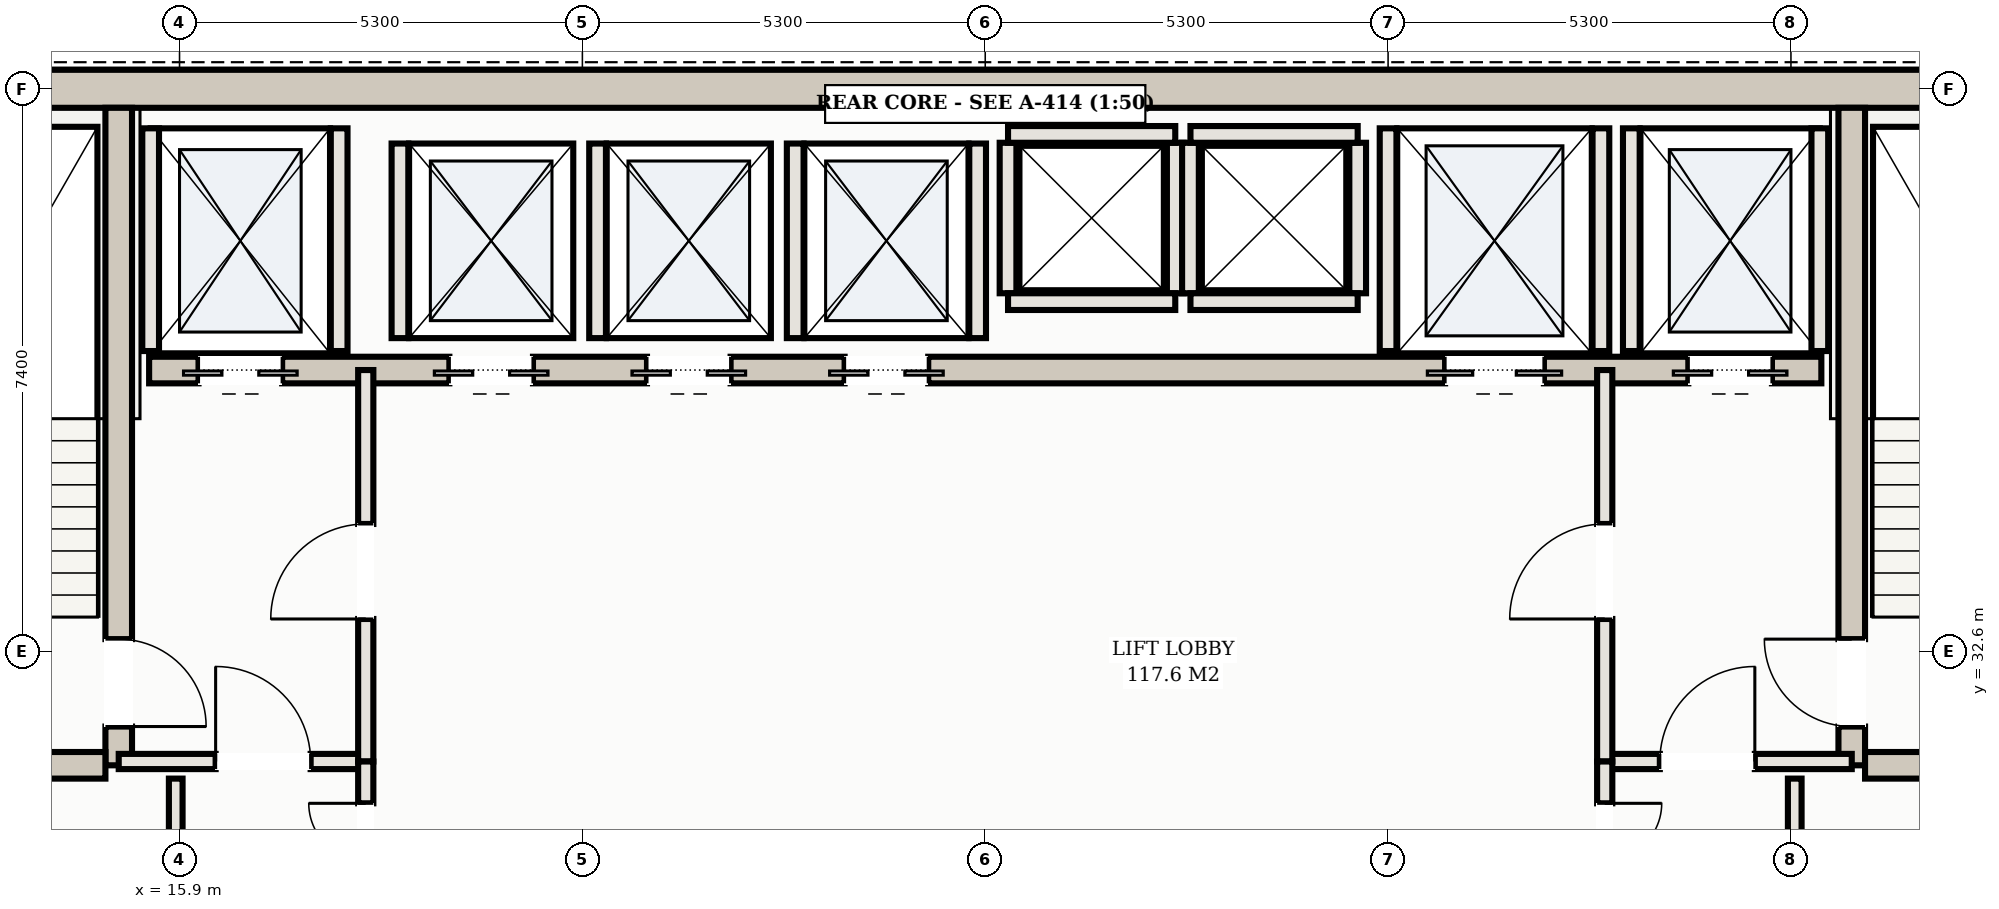
"""IFC4 building model, lengths in metres.
Left out: names, types, materials, properties, quantities, classifications, styles, units other than length and angle.
Written with IfcOpenShell. Run it as: python <this file> out.ifc"""

import sys

from ifc_helpers import new_model, si_unit, direction, frame, frame_2d, origin, place, context, subcontext, project, spatial, rectangle, extrude, element, fill, save


model = new_model("IFC4")
c1 = context("Model", 3, precision=1e-05, world=origin(), true_north=direction((0.0, 1.0)))
c2 = subcontext(c1, "Body", "Model", "MODEL_VIEW")
j1 = project(units=[si_unit("LENGTHUNIT", "METRE"), si_unit("PLANEANGLEUNIT", "RADIAN")], contexts=[c1])
p1 = place(None, origin())
s1 = spatial("IfcSite", under=j1, at=p1, CompositionType="ELEMENT")
p2 = place(p1, origin())
s2 = spatial("IfcBuilding", under=s1, at=p2, CompositionType="ELEMENT")
p3 = place(p2, frame((0.0, 0.0, 236.3)))
s3 = spatial("IfcBuildingStorey", under=s2, at=p3, CompositionType="ELEMENT", Elevation=236.3)
p4 = place(p3, frame((10.35, 40.0, 0.0), z_axis=(0.0, 0.0, 1.0), x_axis=(1.0, 0.0, 0.0)))
e1 = element("IfcWall", 1, at=p4, inside=s3, PredefinedType="SHEAR", context=c2, shape_type="SweptSolid", body=[
    extrude(rectangle(XDim=32.3, YDim=0.5, at=frame_2d((16.15, 0.0))), origin(), (0.0, 0.0, 1.0), 3.11),
])
p5 = place(p3, frame((15.1, 31.1, 0.0), z_axis=(0.0, 0.0, 1.0), x_axis=(0.0, 1.0, 0.0)))
e2 = element("IfcWall", 2, at=p5, inside=s3, PredefinedType="SHEAR", context=c2, shape_type="SweptSolid", body=[
    extrude(rectangle(XDim=8.65, YDim=0.35, at=frame_2d((4.325, 0.0))), origin(), (0.0, 0.0, 1.0), 3.11),
])
p6 = place(p5, frame((0.51, 0.0, 0.0)))
e3 = element("IfcOpeningElement", 3, at=p6, cuts=e2, PredefinedType="OPENING", context=c2, shape_type="SweptSolid", body=[
    extrude(rectangle(XDim=1.15, YDim=2.2, at=frame_2d((0.575, 1.1))), frame((0.0, 0.185, 0.0), z_axis=(0.0, -1.0, 0.0), x_axis=(1.0, 0.0, 0.0)), (0.0, 0.0, 1.0), 0.37),
])
p7 = place(p3, frame((10.85, 31.1, 0.0), z_axis=(0.0, 0.0, 1.0), x_axis=(1.0, 0.0, 0.0)))
e4 = element("IfcWall", 4, at=p7, inside=s3, PredefinedType="SHEAR", context=c2, shape_type="SweptSolid", body=[
    extrude(rectangle(XDim=4.075, YDim=0.35, at=frame_2d((2.038, 0.0))), origin(), (0.0, 0.0, 1.0), 3.11),
])
p8 = place(p3, frame((37.9, 31.1, 0.0), z_axis=(0.0, 0.0, 1.0), x_axis=(0.0, 1.0, 0.0)))
e5 = element("IfcWall", 5, at=p8, inside=s3, PredefinedType="SHEAR", context=c2, shape_type="SweptSolid", body=[
    extrude(rectangle(XDim=8.65, YDim=0.35, at=frame_2d((4.325, 0.0))), origin(), (0.0, 0.0, 1.0), 3.11),
])
p9 = place(p8, frame((0.51, 0.0, 0.0)))
e6 = element("IfcOpeningElement", 6, at=p9, cuts=e5, PredefinedType="OPENING", context=c2, shape_type="SweptSolid", body=[
    extrude(rectangle(XDim=1.15, YDim=2.2, at=frame_2d((0.575, 1.1))), frame((0.0, 0.185, 0.0), z_axis=(0.0, -1.0, 0.0), x_axis=(1.0, 0.0, 0.0)), (0.0, 0.0, 1.0), 0.37),
])
p10 = place(p3, frame((38.075, 31.1, 0.0), z_axis=(0.0, 0.0, 1.0), x_axis=(1.0, 0.0, 0.0)))
e7 = element("IfcWall", 7, at=p10, inside=s3, PredefinedType="SHEAR", context=c2, shape_type="SweptSolid", body=[
    extrude(rectangle(XDim=4.075, YDim=0.35, at=frame_2d((2.038, 0.0))), origin(), (0.0, 0.0, 1.0), 3.11),
])
p11 = place(p3, frame((15.5, 36.3, 0.0), z_axis=(0.0, 0.0, 1.0), x_axis=(1.0, 0.0, 0.0)))
e8 = element("IfcWall", 8, at=p11, inside=s3, PredefinedType="SHEAR", context=c2, shape_type="SweptSolid", body=[
    extrude(rectangle(XDim=22.0, YDim=0.35, at=frame_2d((11.0, 0.0))), origin(), (0.0, 0.0, 1.0), 3.11),
])
p12 = place(p11, frame((0.65, 0.0, 0.0)))
e9 = element("IfcOpeningElement", 9, at=p12, cuts=e8, PredefinedType="OPENING", context=c2, shape_type="SweptSolid", body=[
    extrude(rectangle(XDim=1.1, YDim=2.15, at=frame_2d((0.55, 1.075))), frame((0.0, 0.185, 0.0), z_axis=(0.0, -1.0, 0.0), x_axis=(1.0, 0.0, 0.0)), (0.0, 0.0, 1.0), 0.37),
])
p13 = place(p11, frame((20.25, 0.0, 0.0)))
e10 = element("IfcOpeningElement", 10, at=p13, cuts=e8, PredefinedType="OPENING", context=c2, shape_type="SweptSolid", body=[
    extrude(rectangle(XDim=1.1, YDim=2.15, at=frame_2d((0.55, 1.075))), frame((0.0, 0.185, 0.0), z_axis=(0.0, -1.0, 0.0), x_axis=(1.0, 0.0, 0.0)), (0.0, 0.0, 1.0), 0.37),
])
p14 = place(p11, frame((17.05, 0.0, 0.0)))
e11 = element("IfcOpeningElement", 11, at=p14, cuts=e8, PredefinedType="OPENING", context=c2, shape_type="SweptSolid", body=[
    extrude(rectangle(XDim=1.3, YDim=2.2, at=frame_2d((0.65, 1.1))), frame((0.0, 0.185, 0.0), z_axis=(0.0, -1.0, 0.0), x_axis=(1.0, 0.0, 0.0)), (0.0, 0.0, 1.0), 0.37),
])
p15 = place(p11, frame((3.95, 0.0, 0.0)))
e12 = element("IfcOpeningElement", 12, at=p15, cuts=e8, PredefinedType="OPENING", context=c2, shape_type="SweptSolid", body=[
    extrude(rectangle(XDim=1.1, YDim=2.15, at=frame_2d((0.55, 1.075))), frame((0.0, 0.185, 0.0), z_axis=(0.0, -1.0, 0.0), x_axis=(1.0, 0.0, 0.0)), (0.0, 0.0, 1.0), 0.37),
])
p16 = place(p11, frame((6.55, 0.0, 0.0)))
e13 = element("IfcOpeningElement", 13, at=p16, cuts=e8, PredefinedType="OPENING", context=c2, shape_type="SweptSolid", body=[
    extrude(rectangle(XDim=1.1, YDim=2.15, at=frame_2d((0.55, 1.075))), frame((0.0, 0.185, 0.0), z_axis=(0.0, -1.0, 0.0), x_axis=(1.0, 0.0, 0.0)), (0.0, 0.0, 1.0), 0.37),
])
p17 = place(p11, frame((9.15, 0.0, 0.0)))
e14 = element("IfcOpeningElement", 14, at=p17, cuts=e8, PredefinedType="OPENING", context=c2, shape_type="SweptSolid", body=[
    extrude(rectangle(XDim=1.1, YDim=2.15, at=frame_2d((0.55, 1.075))), frame((0.0, 0.185, 0.0), z_axis=(0.0, -1.0, 0.0), x_axis=(1.0, 0.0, 0.0)), (0.0, 0.0, 1.0), 0.37),
])
for number, where, z_axis, x_axis in (
    (15, (15.52, 36.55, 0.0), (0.0, 0.0, 1.0), (0.0, 1.0, 0.0)),
    (16, (18.0, 36.55, 0.0), (0.0, 0.0, 1.0), (0.0, 1.0, 0.0)),
    (17, (35.0, 36.55, 0.0), (0.0, 0.0, 1.0), (0.0, 1.0, 0.0)),
    (18, (37.48, 36.55, 0.0), (0.0, 0.0, 1.0), (0.0, 1.0, 0.0)),
    (19, (31.8, 36.55, 0.0), (0.0, 0.0, 1.0), (0.0, 1.0, 0.0)),
    (20, (34.6, 36.55, 0.0), (0.0, 0.0, 1.0), (0.0, 1.0, 0.0)),
):
    element("IfcWall", number, at=place(p3, frame(where, z_axis=z_axis, x_axis=x_axis)), inside=s3, PredefinedType="SOLIDWALL", context=c2, shape_type="SweptSolid", body=[
        extrude(rectangle(XDim=2.93, YDim=0.22, at=frame_2d((1.465, 0.0))), origin(), (0.0, 0.0, 1.0), 3.11),
    ])
for number, where, z_axis, x_axis in (
    (21, (18.8, 36.72, 0.0), (0.0, 0.0, 1.0), (0.0, 1.0, 0.0)),
    (22, (21.4, 36.72, 0.0), (0.0, 0.0, 1.0), (0.0, 1.0, 0.0)),
    (23, (24.0, 36.72, 0.0), (0.0, 0.0, 1.0), (0.0, 1.0, 0.0)),
    (24, (26.4, 36.72, 0.0), (0.0, 0.0, 1.0), (0.0, 1.0, 0.0)),
):
    element("IfcWall", number, at=place(p3, frame(where, z_axis=z_axis, x_axis=x_axis)), inside=s3, PredefinedType="SOLIDWALL", context=c2, shape_type="SweptSolid", body=[
        extrude(rectangle(XDim=2.56, YDim=0.22, at=frame_2d((1.28, 0.0))), origin(), (0.0, 0.0, 1.0), 3.11),
    ])
for number, where, z_axis, x_axis in (
    (25, (26.8, 37.31, 0.0), (0.0, 0.0, 1.0), (0.0, 1.0, 0.0)),
    (26, (29.0, 37.31, 0.0), (0.0, 0.0, 1.0), (0.0, 1.0, 0.0)),
):
    element("IfcWall", number, at=place(p3, frame(where, z_axis=z_axis, x_axis=x_axis)), inside=s3, PredefinedType="SOLIDWALL", context=c2, shape_type="SweptSolid", body=[
        extrude(rectangle(XDim=1.98, YDim=0.22, at=frame_2d((0.99, 0.0))), origin(), (0.0, 0.0, 1.0), 3.11),
    ])
for number, where, z_axis, x_axis in (
    (27, (26.8, 39.4, 0.0), (0.0, 0.0, 1.0), (1.0, 0.0, 0.0)),
    (28, (26.8, 37.2, 0.0), (0.0, 0.0, 1.0), (1.0, 0.0, 0.0)),
):
    element("IfcWall", number, at=place(p3, frame(where, z_axis=z_axis, x_axis=x_axis)), inside=s3, PredefinedType="SOLIDWALL", context=c2, shape_type="SweptSolid", body=[
        extrude(rectangle(XDim=2.2, YDim=0.22, at=frame_2d((1.1, 0.0))), origin(), (0.0, 0.0, 1.0), 3.11),
    ])
for number, where, z_axis, x_axis in (
    (29, (29.2, 37.31, 0.0), (0.0, 0.0, 1.0), (0.0, 1.0, 0.0)),
    (30, (31.4, 37.31, 0.0), (0.0, 0.0, 1.0), (0.0, 1.0, 0.0)),
):
    element("IfcWall", number, at=place(p3, frame(where, z_axis=z_axis, x_axis=x_axis)), inside=s3, PredefinedType="SOLIDWALL", context=c2, shape_type="SweptSolid", body=[
        extrude(rectangle(XDim=1.98, YDim=0.22, at=frame_2d((0.99, 0.0))), origin(), (0.0, 0.0, 1.0), 3.11),
    ])
for number, where, z_axis, x_axis in (
    (31, (29.2, 39.4, 0.0), (0.0, 0.0, 1.0), (1.0, 0.0, 0.0)),
    (32, (29.2, 37.2, 0.0), (0.0, 0.0, 1.0), (1.0, 0.0, 0.0)),
):
    element("IfcWall", number, at=place(p3, frame(where, z_axis=z_axis, x_axis=x_axis)), inside=s3, PredefinedType="SOLIDWALL", context=c2, shape_type="SweptSolid", body=[
        extrude(rectangle(XDim=2.2, YDim=0.22, at=frame_2d((1.1, 0.0))), origin(), (0.0, 0.0, 1.0), 3.11),
    ])
p18 = place(p3, frame((15.1, 31.15, 0.0), z_axis=(0.0, 0.0, 1.0), x_axis=(1.0, 0.0, 0.0)))
e33 = element("IfcWall", 33, at=p18, inside=s3, PredefinedType="PARTITIONING", context=c2, shape_type="SweptSolid", body=[
    extrude(rectangle(XDim=3.25, YDim=0.2, at=frame_2d((1.625, 0.0))), origin(), (0.0, 0.0, 1.0), 2.45),
])
p19 = place(p18, frame((1.275, 0.0, 0.0)))
e34 = element("IfcOpeningElement", 34, at=p19, cuts=e33, PredefinedType="OPENING", context=c2, shape_type="SweptSolid", body=[
    extrude(rectangle(XDim=1.25, YDim=2.2, at=frame_2d((0.625, 1.1))), frame((0.0, 0.11, 0.0), z_axis=(0.0, -1.0, 0.0), x_axis=(1.0, 0.0, 0.0)), (0.0, 0.0, 1.0), 0.22),
])
p20 = place(p3, frame((18.35, 31.15, 0.0), z_axis=(0.0, 0.0, 1.0), x_axis=(0.0, 1.0, 0.0)))
e35 = element("IfcWall", 35, at=p20, inside=s3, PredefinedType="PARTITIONING", context=c2, shape_type="SweptSolid", body=[
    extrude(rectangle(XDim=5.15, YDim=0.2, at=frame_2d((2.575, 0.0))), origin(), (0.0, 0.0, 1.0), 2.45),
])
p21 = place(p20, frame((1.875, 0.0, 0.0)))
e36 = element("IfcOpeningElement", 36, at=p21, cuts=e35, PredefinedType="OPENING", context=c2, shape_type="SweptSolid", body=[
    extrude(rectangle(XDim=1.25, YDim=2.2, at=frame_2d((0.625, 1.1))), frame((0.0, 0.11, 0.0), z_axis=(0.0, -1.0, 0.0), x_axis=(1.0, 0.0, 0.0)), (0.0, 0.0, 1.0), 0.22),
])
p22 = place(p3, frame((34.65, 31.15, 0.0), z_axis=(0.0, 0.0, 1.0), x_axis=(1.0, 0.0, 0.0)))
e37 = element("IfcWall", 37, at=p22, inside=s3, PredefinedType="PARTITIONING", context=c2, shape_type="SweptSolid", body=[
    extrude(rectangle(XDim=3.25, YDim=0.2, at=frame_2d((1.625, 0.0))), origin(), (0.0, 0.0, 1.0), 2.45),
])
p23 = place(p22, frame((0.725, 0.0, 0.0)))
e38 = element("IfcOpeningElement", 38, at=p23, cuts=e37, PredefinedType="OPENING", context=c2, shape_type="SweptSolid", body=[
    extrude(rectangle(XDim=1.25, YDim=2.2, at=frame_2d((0.625, 1.1))), frame((0.0, 0.11, 0.0), z_axis=(0.0, -1.0, 0.0), x_axis=(1.0, 0.0, 0.0)), (0.0, 0.0, 1.0), 0.22),
])
p24 = place(p3, frame((34.65, 31.15, 0.0), z_axis=(0.0, 0.0, 1.0), x_axis=(0.0, 1.0, 0.0)))
e39 = element("IfcWall", 39, at=p24, inside=s3, PredefinedType="PARTITIONING", context=c2, shape_type="SweptSolid", body=[
    extrude(rectangle(XDim=5.15, YDim=0.2, at=frame_2d((2.575, 0.0))), origin(), (0.0, 0.0, 1.0), 2.45),
])
p25 = place(p24, frame((1.875, 0.0, 0.0)))
e40 = element("IfcOpeningElement", 40, at=p25, cuts=e39, PredefinedType="OPENING", context=c2, shape_type="SweptSolid", body=[
    extrude(rectangle(XDim=1.25, YDim=2.2, at=frame_2d((0.625, 1.1))), frame((0.0, 0.11, 0.0), z_axis=(0.0, -1.0, 0.0), x_axis=(1.0, 0.0, 0.0)), (0.0, 0.0, 1.0), 0.22),
])
p26 = place(p3, frame((15.85, 25.45, 0.0), z_axis=(0.0, 0.0, 1.0), x_axis=(0.0, 1.0, 0.0)))
e41 = element("IfcWall", 41, at=p26, inside=s3, PredefinedType="PARTITIONING", context=c2, shape_type="SweptSolid", body=[
    extrude(rectangle(XDim=5.475, YDim=0.18, at=frame_2d((2.738, 0.0))), origin(), (0.0, 0.0, 1.0), 2.45),
])
p27 = place(p26, frame((2.277, 0.0, 0.0)))
e42 = element("IfcOpeningElement", 42, at=p27, cuts=e41, PredefinedType="OPENING", context=c2, shape_type="SweptSolid", body=[
    extrude(rectangle(XDim=0.92, YDim=2.15, at=frame_2d((0.46, 1.075))), frame((0.0, 0.1, 0.0), z_axis=(0.0, -1.0, 0.0), x_axis=(1.0, 0.0, 0.0)), (0.0, 0.0, 1.0), 0.2),
])
p28 = place(p3, frame((37.15, 25.45, 0.0), z_axis=(0.0, 0.0, 1.0), x_axis=(0.0, 1.0, 0.0)))
e43 = element("IfcWall", 43, at=p28, inside=s3, PredefinedType="PARTITIONING", context=c2, shape_type="SweptSolid", body=[
    extrude(rectangle(XDim=5.475, YDim=0.18, at=frame_2d((2.738, 0.0))), origin(), (0.0, 0.0, 1.0), 2.45),
])
p29 = place(p28, frame((2.277, 0.0, 0.0)))
e44 = element("IfcOpeningElement", 44, at=p29, cuts=e43, PredefinedType="OPENING", context=c2, shape_type="SweptSolid", body=[
    extrude(rectangle(XDim=0.92, YDim=2.15, at=frame_2d((0.46, 1.075))), frame((0.0, 0.1, 0.0), z_axis=(0.0, -1.0, 0.0), x_axis=(1.0, 0.0, 0.0)), (0.0, 0.0, 1.0), 0.2),
])
p30 = place(p3, frame((18.35, 28.55, 0.0), z_axis=(0.0, 0.0, 1.0), x_axis=(0.0, 1.0, 0.0)))
e45 = element("IfcWall", 45, at=p30, inside=s3, PredefinedType="PARTITIONING", context=c2, shape_type="SweptSolid", body=[
    extrude(rectangle(XDim=2.6, YDim=0.2, at=frame_2d((1.3, 0.0))), origin(), (0.0, 0.0, 1.0), 2.45),
])
p31 = place(p30, frame((0.55, 0.0, 0.0)))
e46 = element("IfcOpeningElement", 46, at=p31, cuts=e45, PredefinedType="OPENING", context=c2, shape_type="SweptSolid", body=[
    extrude(rectangle(XDim=1.5, YDim=2.25, at=frame_2d((0.75, 1.125))), frame((0.0, 0.11, 0.0), z_axis=(0.0, -1.0, 0.0), x_axis=(1.0, 0.0, 0.0)), (0.0, 0.0, 1.0), 0.22),
])
p32 = place(p3, frame((34.65, 28.55, 0.0), z_axis=(0.0, 0.0, 1.0), x_axis=(0.0, 1.0, 0.0)))
e47 = element("IfcWall", 47, at=p32, inside=s3, PredefinedType="PARTITIONING", context=c2, shape_type="SweptSolid", body=[
    extrude(rectangle(XDim=2.6, YDim=0.2, at=frame_2d((1.3, 0.0))), origin(), (0.0, 0.0, 1.0), 2.45),
])
p33 = place(p32, frame((0.55, 0.0, 0.0)))
e48 = element("IfcOpeningElement", 48, at=p33, cuts=e47, PredefinedType="OPENING", context=c2, shape_type="SweptSolid", body=[
    extrude(rectangle(XDim=1.5, YDim=2.25, at=frame_2d((0.75, 1.125))), frame((0.0, 0.11, 0.0), z_axis=(0.0, -1.0, 0.0), x_axis=(1.0, 0.0, 0.0)), (0.0, 0.0, 1.0), 0.22),
])
p34 = place(p12, frame((1.1, 0.0, 0.0), z_axis=(0.0, 0.0, 1.0), x_axis=(-1.0, 0.0, 0.0)))
e49 = element("IfcDoor", 49, at=p34, inside=s3, OperationType="DOUBLE_DOOR_SLIDING", PredefinedType="DOOR", context=c2, shape_type="SweptSolid", body=[
    extrude(rectangle(XDim=1.1, YDim=2.15, at=frame_2d((0.55, 1.075))), frame((0.0, 0.025, 0.0), z_axis=(0.0, -1.0, 0.0), x_axis=(1.0, 0.0, 0.0)), (0.0, 0.0, 1.0), 0.05),
])
fill(e9, e49)
p35 = place(p13, frame((1.1, 0.0, 0.0), z_axis=(0.0, 0.0, 1.0), x_axis=(-1.0, 0.0, 0.0)))
e50 = element("IfcDoor", 50, at=p35, inside=s3, OperationType="DOUBLE_DOOR_SLIDING", PredefinedType="DOOR", context=c2, shape_type="SweptSolid", body=[
    extrude(rectangle(XDim=1.1, YDim=2.15, at=frame_2d((0.55, 1.075))), frame((0.0, 0.025, 0.0), z_axis=(0.0, -1.0, 0.0), x_axis=(1.0, 0.0, 0.0)), (0.0, 0.0, 1.0), 0.05),
])
fill(e10, e50)
p36 = place(p14, frame((1.3, 0.0, 0.0), z_axis=(0.0, 0.0, 1.0), x_axis=(-1.0, 0.0, 0.0)))
e51 = element("IfcDoor", 51, at=p36, inside=s3, OperationType="DOUBLE_DOOR_SLIDING", PredefinedType="DOOR", context=c2, shape_type="SweptSolid", body=[
    extrude(rectangle(XDim=1.3, YDim=2.2, at=frame_2d((0.65, 1.1))), frame((0.0, 0.025, 0.0), z_axis=(0.0, -1.0, 0.0), x_axis=(1.0, 0.0, 0.0)), (0.0, 0.0, 1.0), 0.05),
])
fill(e11, e51)
p37 = place(p15, frame((1.1, 0.0, 0.0), z_axis=(0.0, 0.0, 1.0), x_axis=(-1.0, 0.0, 0.0)))
e52 = element("IfcDoor", 52, at=p37, inside=s3, OperationType="DOUBLE_DOOR_SLIDING", PredefinedType="DOOR", context=c2, shape_type="SweptSolid", body=[
    extrude(rectangle(XDim=1.1, YDim=2.15, at=frame_2d((0.55, 1.075))), frame((0.0, 0.025, 0.0), z_axis=(0.0, -1.0, 0.0), x_axis=(1.0, 0.0, 0.0)), (0.0, 0.0, 1.0), 0.05),
])
fill(e12, e52)
p38 = place(p16, frame((1.1, 0.0, 0.0), z_axis=(0.0, 0.0, 1.0), x_axis=(-1.0, 0.0, 0.0)))
e53 = element("IfcDoor", 53, at=p38, inside=s3, OperationType="DOUBLE_DOOR_SLIDING", PredefinedType="DOOR", context=c2, shape_type="SweptSolid", body=[
    extrude(rectangle(XDim=1.1, YDim=2.15, at=frame_2d((0.55, 1.075))), frame((0.0, 0.025, 0.0), z_axis=(0.0, -1.0, 0.0), x_axis=(1.0, 0.0, 0.0)), (0.0, 0.0, 1.0), 0.05),
])
fill(e13, e53)
p39 = place(p17, frame((1.1, 0.0, 0.0), z_axis=(0.0, 0.0, 1.0), x_axis=(-1.0, 0.0, 0.0)))
e54 = element("IfcDoor", 54, at=p39, inside=s3, OperationType="DOUBLE_DOOR_SLIDING", PredefinedType="DOOR", context=c2, shape_type="SweptSolid", body=[
    extrude(rectangle(XDim=1.1, YDim=2.15, at=frame_2d((0.55, 1.075))), frame((0.0, 0.025, 0.0), z_axis=(0.0, -1.0, 0.0), x_axis=(1.0, 0.0, 0.0)), (0.0, 0.0, 1.0), 0.05),
])
fill(e14, e54)
p40 = place(p19, origin())
e55 = element("IfcDoor", 55, at=p40, inside=s3, OperationType="SINGLE_SWING_LEFT", PredefinedType="DOOR", context=c2, shape_type="SweptSolid", body=[
    extrude(rectangle(XDim=1.25, YDim=2.2, at=frame_2d((0.625, 1.1))), frame((0.0, 0.025, 0.0), z_axis=(0.0, -1.0, 0.0), x_axis=(1.0, 0.0, 0.0)), (0.0, 0.0, 1.0), 0.05),
])
fill(e34, e55)
p41 = place(p21, origin())
e56 = element("IfcDoor", 56, at=p41, inside=s3, OperationType="SINGLE_SWING_LEFT", PredefinedType="DOOR", context=c2, shape_type="SweptSolid", body=[
    extrude(rectangle(XDim=1.25, YDim=2.2, at=frame_2d((0.625, 1.1))), frame((0.0, 0.025, 0.0), z_axis=(0.0, -1.0, 0.0), x_axis=(1.0, 0.0, 0.0)), (0.0, 0.0, 1.0), 0.05),
])
fill(e36, e56)
p42 = place(p23, origin())
e57 = element("IfcDoor", 57, at=p42, inside=s3, OperationType="SINGLE_SWING_RIGHT", PredefinedType="DOOR", context=c2, shape_type="SweptSolid", body=[
    extrude(rectangle(XDim=1.25, YDim=2.2, at=frame_2d((0.625, 1.1))), frame((0.0, 0.025, 0.0), z_axis=(0.0, -1.0, 0.0), x_axis=(1.0, 0.0, 0.0)), (0.0, 0.0, 1.0), 0.05),
])
fill(e38, e57)
p43 = place(p25, origin())
e58 = element("IfcDoor", 58, at=p43, inside=s3, OperationType="SINGLE_SWING_LEFT", PredefinedType="DOOR", context=c2, shape_type="SweptSolid", body=[
    extrude(rectangle(XDim=1.25, YDim=2.2, at=frame_2d((0.625, 1.1))), frame((0.0, 0.025, 0.0), z_axis=(0.0, -1.0, 0.0), x_axis=(1.0, 0.0, 0.0)), (0.0, 0.0, 1.0), 0.05),
])
fill(e40, e58)
p44 = place(p6, frame((1.15, 0.0, 0.0), z_axis=(0.0, 0.0, 1.0), x_axis=(-1.0, 0.0, 0.0)))
e59 = element("IfcDoor", 59, at=p44, inside=s3, OperationType="SINGLE_SWING_RIGHT", PredefinedType="DOOR", context=c2, shape_type="SweptSolid", body=[
    extrude(rectangle(XDim=1.15, YDim=2.2, at=frame_2d((0.575, 1.1))), frame((0.0, 0.025, 0.0), z_axis=(0.0, -1.0, 0.0), x_axis=(1.0, 0.0, 0.0)), (0.0, 0.0, 1.0), 0.05),
])
fill(e3, e59)
p45 = place(p9, origin())
e60 = element("IfcDoor", 60, at=p45, inside=s3, OperationType="SINGLE_SWING_RIGHT", PredefinedType="DOOR", context=c2, shape_type="SweptSolid", body=[
    extrude(rectangle(XDim=1.15, YDim=2.2, at=frame_2d((0.575, 1.1))), frame((0.0, 0.025, 0.0), z_axis=(0.0, -1.0, 0.0), x_axis=(1.0, 0.0, 0.0)), (0.0, 0.0, 1.0), 0.05),
])
fill(e6, e60)
p46 = place(p31, origin())
e61 = element("IfcDoor", 61, at=p46, inside=s3, OperationType="DOUBLE_DOOR_SINGLE_SWING", PredefinedType="DOOR", context=c2, shape_type="SweptSolid", body=[
    extrude(rectangle(XDim=1.5, YDim=2.25, at=frame_2d((0.75, 1.125))), frame((0.0, 0.025, 0.0), z_axis=(0.0, -1.0, 0.0), x_axis=(1.0, 0.0, 0.0)), (0.0, 0.0, 1.0), 0.05),
])
fill(e46, e61)
p47 = place(p33, frame((1.5, 0.0, 0.0), z_axis=(0.0, 0.0, 1.0), x_axis=(-1.0, 0.0, 0.0)))
e62 = element("IfcDoor", 62, at=p47, inside=s3, OperationType="DOUBLE_DOOR_SINGLE_SWING", PredefinedType="DOOR", context=c2, shape_type="SweptSolid", body=[
    extrude(rectangle(XDim=1.5, YDim=2.25, at=frame_2d((0.75, 1.125))), frame((0.0, 0.025, 0.0), z_axis=(0.0, -1.0, 0.0), x_axis=(1.0, 0.0, 0.0)), (0.0, 0.0, 1.0), 0.05),
])
fill(e48, e62)
save(model, sys.argv[1])
